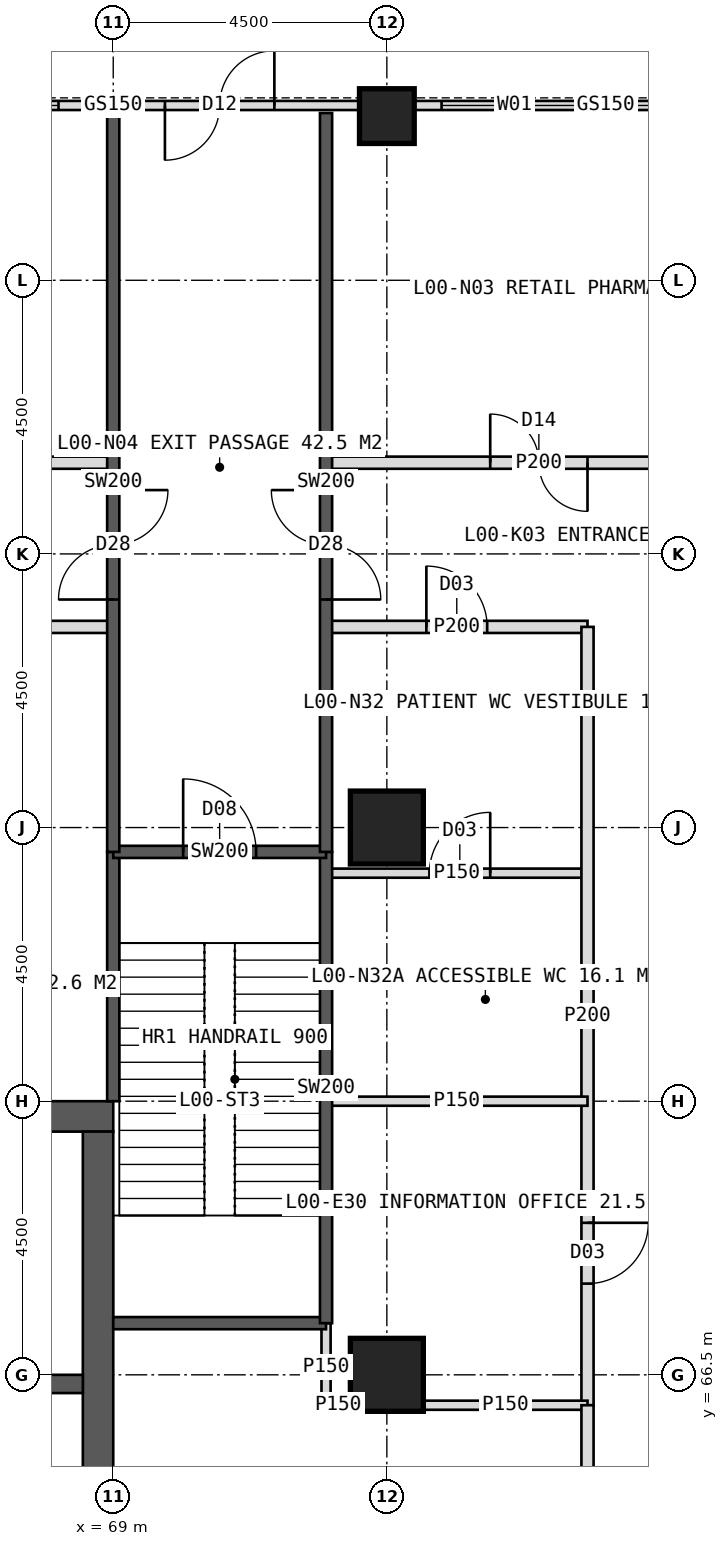
"""IFC4 building model, lengths in metres.
Left out: names, types, materials, properties, quantities, classifications, styles, units other than length and angle.
Written with IfcOpenShell. Run it as: python <this file> out.ifc"""

import sys

from ifc_helpers import new_model, si_unit, direction, frame, frame_2d, origin, origin_2d, place, context, subcontext, project, spatial, rectangle, hollow_rectangle, extrude, element, fill, save


model = new_model("IFC4")
c1 = context("Model", 3, precision=1e-05, world=origin(), true_north=direction((0.0, 1.0)))
c2 = subcontext(c1, "Body", "Model", "MODEL_VIEW")
j1 = project(units=[si_unit("LENGTHUNIT", "METRE"), si_unit("PLANEANGLEUNIT", "RADIAN")], contexts=[c1])
p1 = place(None, origin())
s1 = spatial("IfcSite", under=j1, at=p1, CompositionType="ELEMENT")
p2 = place(p1, origin())
s2 = spatial("IfcBuilding", under=s1, at=p2, CompositionType="ELEMENT")
p3 = place(p2, origin())
s3 = spatial("IfcBuildingStorey", under=s2, at=p3, CompositionType="ELEMENT", Elevation=0.0)
p4 = place(p3, frame((51.0, 70.75, 0.0), z_axis=(0.0, 0.0, 1.0), x_axis=(1.0, 0.0, 0.0)))
e1 = element("IfcWall", 1, at=p4, inside=s3, PredefinedType="SHEAR", context=c2, shape_type="SweptSolid", body=[
    extrude(rectangle(XDim=18.0, YDim=0.5, at=frame_2d((9.0, 0.0))), origin(), (0.0, 0.0, 1.0), 6.0),
])
p5 = place(p4, frame((8.1, 0.0, 0.0)))
e2 = element("IfcOpeningElement", 2, at=p5, cuts=e1, PredefinedType="OPENING", context=c2, shape_type="SweptSolid", body=[
    extrude(rectangle(XDim=1.8, YDim=2.2, at=frame_2d((0.9, 1.1))), frame((0.0, 0.26, 0.0), z_axis=(0.0, -1.0, 0.0), x_axis=(1.0, 0.0, 0.0)), (0.0, 0.0, 1.0), 0.52),
])
p6 = place(p3, frame((68.75, 53.5, 0.0), z_axis=(0.0, 0.0, 1.0), x_axis=(0.0, 1.0, 0.0)))
e3 = element("IfcWall", 3, at=p6, inside=s3, PredefinedType="SHEAR", context=c2, shape_type="SweptSolid", body=[
    extrude(rectangle(XDim=17.0, YDim=0.5, at=frame_2d((8.5, 0.0))), origin(), (0.0, 0.0, 1.0), 6.0),
])
p7 = place(p6, frame((9.5, 0.0, 0.0)))
e4 = element("IfcOpeningElement", 4, at=p7, cuts=e3, PredefinedType="OPENING", context=c2, shape_type="SweptSolid", body=[
    extrude(rectangle(XDim=1.5, YDim=2.2, at=frame_2d((0.75, 1.1))), frame((0.0, 0.26, 0.0), z_axis=(0.0, -1.0, 0.0), x_axis=(1.0, 0.0, 0.0)), (0.0, 0.0, 1.0), 0.52),
])
p8 = place(p3, frame((65.2, 66.35, 0.0), z_axis=(0.0, 0.0, 1.0), x_axis=(1.0, 0.0, 0.0)))
e5 = element("IfcWall", 5, at=p8, inside=s3, PredefinedType="SHEAR", context=c2, shape_type="SweptSolid", body=[
    extrude(rectangle(XDim=3.3, YDim=0.3, at=frame_2d((1.65, 0.0))), origin(), (0.0, 0.0, 1.0), 6.0),
])
p9 = place(p8, frame((1.05, 0.0, 0.0)))
e6 = element("IfcOpeningElement", 6, at=p9, cuts=e5, PredefinedType="OPENING", context=c2, shape_type="SweptSolid", body=[
    extrude(rectangle(XDim=1.2, YDim=2.2, at=frame_2d((0.6, 1.1))), frame((0.0, 0.16, 0.0), z_axis=(0.0, -1.0, 0.0), x_axis=(1.0, 0.0, 0.0)), (0.0, 0.0, 1.0), 0.32),
])
for number, where, z_axis, x_axis in (
    (7, (73.5, 75.5, 0.0), (0.0, 0.0, 1.0), (1.0, 0.0, 0.0)),
    (8, (73.5, 66.5, 0.0), (0.0, 0.0, 1.0), (1.0, 0.0, 0.0)),
):
    element("IfcColumn", number, at=place(p3, frame(where, z_axis=z_axis, x_axis=x_axis)), inside=s3, PredefinedType="COLUMN", context=c2, shape_type="SweptSolid", body=[
        extrude(hollow_rectangle(XDim=1.2, YDim=1.2, WallThickness=0.1, at=origin_2d()), origin(), (0.0, 0.0, 1.0), 6.0),
    ])
p10 = place(p3, frame((73.5, 87.2, 0.0), z_axis=(0.0, 0.0, 1.0), x_axis=(1.0, 0.0, 0.0)))
e9 = element("IfcColumn", 9, at=p10, inside=s3, PredefinedType="COLUMN", context=c2, shape_type="SweptSolid", body=[
    extrude(hollow_rectangle(XDim=0.9, YDim=0.9, WallThickness=0.08, at=origin_2d()), origin(), (0.0, 0.0, 1.0), 6.0),
])
p11 = place(p3, frame((80.25, 87.375, 0.0), z_axis=(0.0, 0.0, 1.0), x_axis=(-1.0, 0.0, 0.0)))
e10 = element("IfcWall", 10, at=p11, inside=s3, PredefinedType="STANDARD", context=c2, shape_type="SweptSolid", body=[
    extrude(rectangle(XDim=6.3, YDim=0.15, at=frame_2d((3.15, 0.0))), origin(), (0.0, 0.0, 1.0), 5.1),
])
p12 = place(p11, frame((0.45, 0.0, 0.6)))
e11 = element("IfcOpeningElement", 11, at=p12, cuts=e10, PredefinedType="OPENING", context=c2, shape_type="SweptSolid", body=[
    extrude(rectangle(XDim=2.4, YDim=3.0, at=frame_2d((1.2, 1.5))), frame((0.0, 0.085, 0.0), z_axis=(0.0, -1.0, 0.0), x_axis=(1.0, 0.0, 0.0)), (0.0, 0.0, 1.0), 0.17),
])
p13 = place(p11, frame((3.45, 0.0, 0.6)))
e12 = element("IfcOpeningElement", 12, at=p13, cuts=e10, PredefinedType="OPENING", context=c2, shape_type="SweptSolid", body=[
    extrude(rectangle(XDim=2.4, YDim=3.0, at=frame_2d((1.2, 1.5))), frame((0.0, 0.085, 0.0), z_axis=(0.0, -1.0, 0.0), x_axis=(1.0, 0.0, 0.0)), (0.0, 0.0, 1.0), 0.17),
])
p14 = place(p3, frame((73.05, 87.375, 0.0), z_axis=(0.0, 0.0, 1.0), x_axis=(-1.0, 0.0, 0.0)))
e13 = element("IfcWall", 13, at=p14, inside=s3, PredefinedType="STANDARD", context=c2, shape_type="SweptSolid", body=[
    extrude(rectangle(XDim=8.1, YDim=0.15, at=frame_2d((4.05, 0.0))), origin(), (0.0, 0.0, 1.0), 5.1),
])
p15 = place(p14, frame((1.4, 0.0, 0.0)))
e14 = element("IfcOpeningElement", 14, at=p15, cuts=e13, PredefinedType="OPENING", context=c2, shape_type="SweptSolid", body=[
    extrude(rectangle(XDim=1.8, YDim=2.4, at=frame_2d((0.9, 1.2))), frame((0.0, 0.085, 0.0), z_axis=(0.0, -1.0, 0.0), x_axis=(1.0, 0.0, 0.0)), (0.0, 0.0, 1.0), 0.17),
])
p16 = place(p14, frame((4.95, 0.0, 0.6)))
e15 = element("IfcOpeningElement", 15, at=p16, cuts=e13, PredefinedType="OPENING", context=c2, shape_type="SweptSolid", body=[
    extrude(rectangle(XDim=2.4, YDim=3.0, at=frame_2d((1.2, 1.5))), frame((0.0, 0.085, 0.0), z_axis=(0.0, -1.0, 0.0), x_axis=(1.0, 0.0, 0.0)), (0.0, 0.0, 1.0), 0.17),
])
p17 = place(p3, frame((40.5, 81.5, 0.0), z_axis=(0.0, 0.0, 1.0), x_axis=(1.0, 0.0, 0.0)))
e16 = element("IfcWall", 16, at=p17, inside=s3, PredefinedType="PARTITIONING", context=c2, shape_type="SweptSolid", body=[
    extrude(rectangle(XDim=28.5, YDim=0.2, at=frame_2d((14.25, 0.0))), origin(), (0.0, 0.0, 1.0), 5.7),
])
p18 = place(p17, frame((5.5, 0.0, 0.0)))
e17 = element("IfcOpeningElement", 17, at=p18, cuts=e16, PredefinedType="OPENING", context=c2, shape_type="SweptSolid", body=[
    extrude(rectangle(XDim=1.0, YDim=2.1, at=frame_2d((0.5, 1.05))), frame((0.0, 0.11, 0.0), z_axis=(0.0, -1.0, 0.0), x_axis=(1.0, 0.0, 0.0)), (0.0, 0.0, 1.0), 0.22),
])
p19 = place(p17, frame((18.6, 0.0, 0.0)))
e18 = element("IfcOpeningElement", 18, at=p19, cuts=e16, PredefinedType="OPENING", context=c2, shape_type="SweptSolid", body=[
    extrude(rectangle(XDim=1.8, YDim=2.2, at=frame_2d((0.9, 1.1))), frame((0.0, 0.11, 0.0), z_axis=(0.0, -1.0, 0.0), x_axis=(1.0, 0.0, 0.0)), (0.0, 0.0, 1.0), 0.22),
])
p20 = place(p3, frame((72.5, 81.5, 0.0), z_axis=(0.0, 0.0, 1.0), x_axis=(1.0, 0.0, 0.0)))
e19 = element("IfcWall", 19, at=p20, inside=s3, PredefinedType="PARTITIONING", context=c2, shape_type="SweptSolid", body=[
    extrude(rectangle(XDim=7.0, YDim=0.2, at=frame_2d((3.5, 0.0))), origin(), (0.0, 0.0, 1.0), 5.7),
])
p21 = place(p20, frame((2.7, 0.0, 0.0)))
e20 = element("IfcOpeningElement", 20, at=p21, cuts=e19, PredefinedType="OPENING", context=c2, shape_type="SweptSolid", body=[
    extrude(rectangle(XDim=1.6, YDim=2.2, at=frame_2d((0.8, 1.1))), frame((0.0, 0.11, 0.0), z_axis=(0.0, -1.0, 0.0), x_axis=(1.0, 0.0, 0.0)), (0.0, 0.0, 1.0), 0.22),
])
p22 = place(p3, frame((62.25, 78.8, 0.0), z_axis=(0.0, 0.0, 1.0), x_axis=(1.0, 0.0, 0.0)))
e21 = element("IfcWall", 21, at=p22, inside=s3, PredefinedType="PARTITIONING", context=c2, shape_type="SweptSolid", body=[
    extrude(rectangle(XDim=6.75, YDim=0.2, at=frame_2d((3.375, 0.0))), origin(), (0.0, 0.0, 1.0), 5.7),
])
p23 = place(p22, frame((2.875, 0.0, 0.0)))
e22 = element("IfcOpeningElement", 22, at=p23, cuts=e21, PredefinedType="OPENING", context=c2, shape_type="SweptSolid", body=[
    extrude(rectangle(XDim=1.0, YDim=2.1, at=frame_2d((0.5, 1.05))), frame((0.0, 0.11, 0.0), z_axis=(0.0, -1.0, 0.0), x_axis=(1.0, 0.0, 0.0)), (0.0, 0.0, 1.0), 0.22),
])
p24 = place(p3, frame((72.5, 78.8, 0.0), z_axis=(0.0, 0.0, 1.0), x_axis=(1.0, 0.0, 0.0)))
e23 = element("IfcWall", 23, at=p24, inside=s3, PredefinedType="PARTITIONING", context=c2, shape_type="SweptSolid", body=[
    extrude(rectangle(XDim=4.3, YDim=0.2, at=frame_2d((2.15, 0.0))), origin(), (0.0, 0.0, 1.0), 5.7),
])
p25 = place(p24, frame((1.65, 0.0, 0.0)))
e24 = element("IfcOpeningElement", 24, at=p25, cuts=e23, PredefinedType="OPENING", context=c2, shape_type="SweptSolid", body=[
    extrude(rectangle(XDim=1.0, YDim=2.1, at=frame_2d((0.5, 1.05))), frame((0.0, 0.11, 0.0), z_axis=(0.0, -1.0, 0.0), x_axis=(1.0, 0.0, 0.0)), (0.0, 0.0, 1.0), 0.22),
])
p26 = place(p3, frame((72.5, 74.75, 0.0), z_axis=(0.0, 0.0, 1.0), x_axis=(1.0, 0.0, 0.0)))
e25 = element("IfcWall", 25, at=p26, inside=s3, PredefinedType="PARTITIONING", context=c2, shape_type="SweptSolid", body=[
    extrude(rectangle(XDim=4.3, YDim=0.15, at=frame_2d((2.15, 0.0))), origin(), (0.0, 0.0, 1.0), 5.7),
])
p27 = place(p26, frame((1.7, 0.0, 0.0)))
e26 = element("IfcOpeningElement", 26, at=p27, cuts=e25, PredefinedType="OPENING", context=c2, shape_type="SweptSolid", body=[
    extrude(rectangle(XDim=1.0, YDim=2.1, at=frame_2d((0.5, 1.05))), frame((0.0, 0.085, 0.0), z_axis=(0.0, -1.0, 0.0), x_axis=(1.0, 0.0, 0.0)), (0.0, 0.0, 1.0), 0.17),
])
p28 = place(p3, frame((76.8, 78.8, 0.0), z_axis=(0.0, 0.0, 1.0), x_axis=(0.0, -1.0, 0.0)))
e27 = element("IfcWall", 27, at=p28, inside=s3, PredefinedType="PARTITIONING", context=c2, shape_type="SweptSolid", body=[
    extrude(rectangle(XDim=12.8, YDim=0.2, at=frame_2d((6.4, 0.0))), origin(), (0.0, 0.0, 1.0), 5.7),
])
p29 = place(p28, frame((9.8, 0.0, 0.0)))
e28 = element("IfcOpeningElement", 28, at=p29, cuts=e27, PredefinedType="OPENING", context=c2, shape_type="SweptSolid", body=[
    extrude(rectangle(XDim=1.0, YDim=2.1, at=frame_2d((0.5, 1.05))), frame((0.0, 0.11, 0.0), z_axis=(0.0, -1.0, 0.0), x_axis=(1.0, 0.0, 0.0)), (0.0, 0.0, 1.0), 0.22),
])
p30 = place(p3, frame((72.5, 71.0, 0.0), z_axis=(0.0, 0.0, 1.0), x_axis=(1.0, 0.0, 0.0)))
e29 = element("IfcWall", 29, at=p30, inside=s3, PredefinedType="PARTITIONING", context=c2, shape_type="SweptSolid", body=[
    extrude(rectangle(XDim=4.3, YDim=0.15, at=frame_2d((2.15, 0.0))), origin(), (0.0, 0.0, 1.0), 5.7),
])
p31 = place(p3, frame((72.5, 66.0, 0.0), z_axis=(0.0, 0.0, 1.0), x_axis=(1.0, 0.0, 0.0)))
e30 = element("IfcWall", 30, at=p31, inside=s3, PredefinedType="PARTITIONING", context=c2, shape_type="SweptSolid", body=[
    extrude(rectangle(XDim=0.4, YDim=0.15, at=frame_2d((0.2, 0.0))), origin(), (0.0, 0.0, 1.0), 5.7),
])
p32 = place(p3, frame((74.1, 66.0, 0.0), z_axis=(0.0, 0.0, 1.0), x_axis=(1.0, 0.0, 0.0)))
e31 = element("IfcWall", 31, at=p32, inside=s3, PredefinedType="PARTITIONING", context=c2, shape_type="SweptSolid", body=[
    extrude(rectangle(XDim=2.7, YDim=0.15, at=frame_2d((1.35, 0.0))), origin(), (0.0, 0.0, 1.0), 5.7),
])
p33 = place(p3, frame((72.5, 65.9, 0.0), z_axis=(0.0, 0.0, 1.0), x_axis=(0.0, 1.0, 0.0)))
e32 = element("IfcWall", 32, at=p33, inside=s3, PredefinedType="PARTITIONING", context=c2, shape_type="SweptSolid", body=[
    extrude(rectangle(XDim=1.45, YDim=0.15, at=frame_2d((0.725, 0.0))), origin(), (0.0, 0.0, 1.0), 5.7),
])
p34 = place(p3, frame((69.0, 71.0, 0.0), z_axis=(0.0, 0.0, 1.0), x_axis=(0.0, 1.0, 0.0)))
e33 = element("IfcWall", 33, at=p34, inside=s3, PredefinedType="SOLIDWALL", context=c2, shape_type="SweptSolid", body=[
    extrude(rectangle(XDim=4.1, YDim=0.2, at=frame_2d((2.05, 0.0))), origin(), (0.0, 0.0, 1.0), 5.7),
])
p35 = place(p3, frame((69.0, 67.35, 0.0), z_axis=(0.0, 0.0, 1.0), x_axis=(1.0, 0.0, 0.0)))
e34 = element("IfcWall", 34, at=p35, inside=s3, PredefinedType="SOLIDWALL", context=c2, shape_type="SweptSolid", body=[
    extrude(rectangle(XDim=3.5, YDim=0.2, at=frame_2d((1.75, 0.0))), origin(), (0.0, 0.0, 1.0), 5.7),
])
p36 = place(p3, frame((72.5, 67.35, 0.0), z_axis=(0.0, 0.0, 1.0), x_axis=(0.0, 1.0, 0.0)))
e35 = element("IfcWall", 35, at=p36, inside=s3, PredefinedType="SOLIDWALL", context=c2, shape_type="SweptSolid", body=[
    extrude(rectangle(XDim=7.75, YDim=0.2, at=frame_2d((3.875, 0.0))), origin(), (0.0, 0.0, 1.0), 5.7),
])
p37 = place(p3, frame((69.0, 75.1, 0.0), z_axis=(0.0, 0.0, 1.0), x_axis=(1.0, 0.0, 0.0)))
e36 = element("IfcWall", 36, at=p37, inside=s3, PredefinedType="SOLIDWALL", context=c2, shape_type="SweptSolid", body=[
    extrude(rectangle(XDim=3.5, YDim=0.2, at=frame_2d((1.75, 0.0))), origin(), (0.0, 0.0, 1.0), 5.7),
])
p38 = place(p37, frame((1.15, 0.0, 0.0)))
e37 = element("IfcOpeningElement", 37, at=p38, cuts=e36, PredefinedType="OPENING", context=c2, shape_type="SweptSolid", body=[
    extrude(rectangle(XDim=1.2, YDim=2.1, at=frame_2d((0.6, 1.05))), frame((0.0, 0.11, 0.0), z_axis=(0.0, -1.0, 0.0), x_axis=(1.0, 0.0, 0.0)), (0.0, 0.0, 1.0), 0.22),
])
p39 = place(p3, frame((69.0, 75.1, 0.0), z_axis=(0.0, 0.0, 1.0), x_axis=(0.0, 1.0, 0.0)))
e38 = element("IfcWall", 38, at=p39, inside=s3, PredefinedType="SOLIDWALL", context=c2, shape_type="SweptSolid", body=[
    extrude(rectangle(XDim=12.15, YDim=0.2, at=frame_2d((6.075, 0.0))), origin(), (0.0, 0.0, 1.0), 5.7),
])
p40 = place(p39, frame((4.15, 0.0, 0.0)))
e39 = element("IfcOpeningElement", 39, at=p40, cuts=e38, PredefinedType="OPENING", context=c2, shape_type="SweptSolid", body=[
    extrude(rectangle(XDim=1.8, YDim=2.2, at=frame_2d((0.9, 1.1))), frame((0.0, 0.11, 0.0), z_axis=(0.0, -1.0, 0.0), x_axis=(1.0, 0.0, 0.0)), (0.0, 0.0, 1.0), 0.22),
])
p41 = place(p3, frame((72.5, 75.1, 0.0), z_axis=(0.0, 0.0, 1.0), x_axis=(0.0, 1.0, 0.0)))
e40 = element("IfcWall", 40, at=p41, inside=s3, PredefinedType="SOLIDWALL", context=c2, shape_type="SweptSolid", body=[
    extrude(rectangle(XDim=12.15, YDim=0.2, at=frame_2d((6.075, 0.0))), origin(), (0.0, 0.0, 1.0), 5.7),
])
p42 = place(p41, frame((4.15, 0.0, 0.0)))
e41 = element("IfcOpeningElement", 41, at=p42, cuts=e40, PredefinedType="OPENING", context=c2, shape_type="SweptSolid", body=[
    extrude(rectangle(XDim=1.8, YDim=2.2, at=frame_2d((0.9, 1.1))), frame((0.0, 0.11, 0.0), z_axis=(0.0, -1.0, 0.0), x_axis=(1.0, 0.0, 0.0)), (0.0, 0.0, 1.0), 0.22),
])
p43 = place(p3, frame((76.8, 66.0, 0.0), z_axis=(0.0, 0.0, 1.0), x_axis=(0.0, -1.0, 0.0)))
e42 = element("IfcWall", 42, at=p43, inside=s3, PredefinedType="PARTITIONING", context=c2, shape_type="SweptSolid", body=[
    extrude(rectangle(XDim=4.0, YDim=0.2, at=frame_2d((2.0, 0.0))), origin(), (0.0, 0.0, 1.0), 5.7),
])
p44 = place(p43, frame((1.1, 0.0, 0.0)))
e43 = element("IfcOpeningElement", 43, at=p44, cuts=e42, PredefinedType="OPENING", context=c2, shape_type="SweptSolid", body=[
    extrude(rectangle(XDim=1.8, YDim=2.2, at=frame_2d((0.9, 1.1))), frame((0.0, 0.11, 0.0), z_axis=(0.0, -1.0, 0.0), x_axis=(1.0, 0.0, 0.0)), (0.0, 0.0, 1.0), 0.22),
])
p45 = place(p15, frame((1.8, 0.0, 0.0), z_axis=(0.0, 0.0, 1.0), x_axis=(-1.0, 0.0, 0.0)))
e44 = element("IfcDoor", 44, at=p45, inside=s3, OperationType="DOUBLE_DOOR_SINGLE_SWING", PredefinedType="DOOR", context=c2, shape_type="SweptSolid", body=[
    extrude(rectangle(XDim=1.8, YDim=2.4, at=frame_2d((0.9, 1.2))), frame((0.0, 0.025, 0.0), z_axis=(0.0, -1.0, 0.0), x_axis=(1.0, 0.0, 0.0)), (0.0, 0.0, 1.0), 0.05),
])
fill(e14, e44)
p46 = place(p12, origin())
e45 = element("IfcWindow", 45, at=p46, inside=s3, PartitioningType="SINGLE_PANEL", PredefinedType="WINDOW", context=c2, shape_type="SweptSolid", body=[
    extrude(rectangle(XDim=2.4, YDim=3.0, at=frame_2d((1.2, 1.5))), frame((0.0, 0.03, 0.0), z_axis=(0.0, -1.0, 0.0), x_axis=(1.0, 0.0, 0.0)), (0.0, 0.0, 1.0), 0.06),
])
fill(e11, e45)
p47 = place(p13, origin())
e46 = element("IfcWindow", 46, at=p47, inside=s3, PartitioningType="SINGLE_PANEL", PredefinedType="WINDOW", context=c2, shape_type="SweptSolid", body=[
    extrude(rectangle(XDim=2.4, YDim=3.0, at=frame_2d((1.2, 1.5))), frame((0.0, 0.03, 0.0), z_axis=(0.0, -1.0, 0.0), x_axis=(1.0, 0.0, 0.0)), (0.0, 0.0, 1.0), 0.06),
])
fill(e12, e46)
p48 = place(p16, origin())
e47 = element("IfcWindow", 47, at=p48, inside=s3, PartitioningType="SINGLE_PANEL", PredefinedType="WINDOW", context=c2, shape_type="SweptSolid", body=[
    extrude(rectangle(XDim=2.4, YDim=3.0, at=frame_2d((1.2, 1.5))), frame((0.0, 0.03, 0.0), z_axis=(0.0, -1.0, 0.0), x_axis=(1.0, 0.0, 0.0)), (0.0, 0.0, 1.0), 0.06),
])
fill(e15, e47)
p49 = place(p25, origin())
e48 = element("IfcDoor", 48, at=p49, inside=s3, OperationType="SINGLE_SWING_LEFT", PredefinedType="DOOR", context=c2, shape_type="SweptSolid", body=[
    extrude(rectangle(XDim=1.0, YDim=2.1, at=frame_2d((0.5, 1.05))), frame((0.0, 0.025, 0.0), z_axis=(0.0, -1.0, 0.0), x_axis=(1.0, 0.0, 0.0)), (0.0, 0.0, 1.0), 0.05),
])
fill(e24, e48)
p50 = place(p29, origin())
e49 = element("IfcDoor", 49, at=p50, inside=s3, OperationType="SINGLE_SWING_LEFT", PredefinedType="DOOR", context=c2, shape_type="SweptSolid", body=[
    extrude(rectangle(XDim=1.0, YDim=2.1, at=frame_2d((0.5, 1.05))), frame((0.0, 0.025, 0.0), z_axis=(0.0, -1.0, 0.0), x_axis=(1.0, 0.0, 0.0)), (0.0, 0.0, 1.0), 0.05),
])
fill(e28, e49)
p51 = place(p21, origin())
e50 = element("IfcDoor", 50, at=p51, inside=s3, OperationType="DOUBLE_DOOR_DOUBLE_SWING", PredefinedType="DOOR", context=c2, shape_type="SweptSolid", body=[
    extrude(rectangle(XDim=1.6, YDim=2.2, at=frame_2d((0.8, 1.1))), frame((0.0, 0.025, 0.0), z_axis=(0.0, -1.0, 0.0), x_axis=(1.0, 0.0, 0.0)), (0.0, 0.0, 1.0), 0.05),
])
fill(e20, e50)
p52 = place(p27, origin())
e51 = element("IfcDoor", 51, at=p52, inside=s3, OperationType="SINGLE_SWING_RIGHT", PredefinedType="DOOR", context=c2, shape_type="SweptSolid", body=[
    extrude(rectangle(XDim=1.0, YDim=2.1, at=frame_2d((0.5, 1.05))), frame((0.0, 0.025, 0.0), z_axis=(0.0, -1.0, 0.0), x_axis=(1.0, 0.0, 0.0)), (0.0, 0.0, 1.0), 0.05),
])
fill(e26, e51)
p53 = place(p38, origin())
e52 = element("IfcDoor", 52, at=p53, inside=s3, OperationType="SINGLE_SWING_LEFT", PredefinedType="DOOR", context=c2, shape_type="SweptSolid", body=[
    extrude(rectangle(XDim=1.2, YDim=2.1, at=frame_2d((0.6, 1.05))), frame((0.0, 0.025, 0.0), z_axis=(0.0, -1.0, 0.0), x_axis=(1.0, 0.0, 0.0)), (0.0, 0.0, 1.0), 0.05),
])
fill(e37, e52)
p54 = place(p40, origin())
e53 = element("IfcDoor", 53, at=p54, inside=s3, OperationType="DOUBLE_DOOR_SINGLE_SWING", PredefinedType="DOOR", context=c2, shape_type="SweptSolid", body=[
    extrude(rectangle(XDim=1.8, YDim=2.2, at=frame_2d((0.9, 1.1))), frame((0.0, 0.025, 0.0), z_axis=(0.0, -1.0, 0.0), x_axis=(1.0, 0.0, 0.0)), (0.0, 0.0, 1.0), 0.05),
])
fill(e39, e53)
p55 = place(p42, frame((1.8, 0.0, 0.0), z_axis=(0.0, 0.0, 1.0), x_axis=(-1.0, 0.0, 0.0)))
e54 = element("IfcDoor", 54, at=p55, inside=s3, OperationType="DOUBLE_DOOR_SINGLE_SWING", PredefinedType="DOOR", context=c2, shape_type="SweptSolid", body=[
    extrude(rectangle(XDim=1.8, YDim=2.2, at=frame_2d((0.9, 1.1))), frame((0.0, 0.025, 0.0), z_axis=(0.0, -1.0, 0.0), x_axis=(1.0, 0.0, 0.0)), (0.0, 0.0, 1.0), 0.05),
])
fill(e41, e54)
save(model, sys.argv[1])
